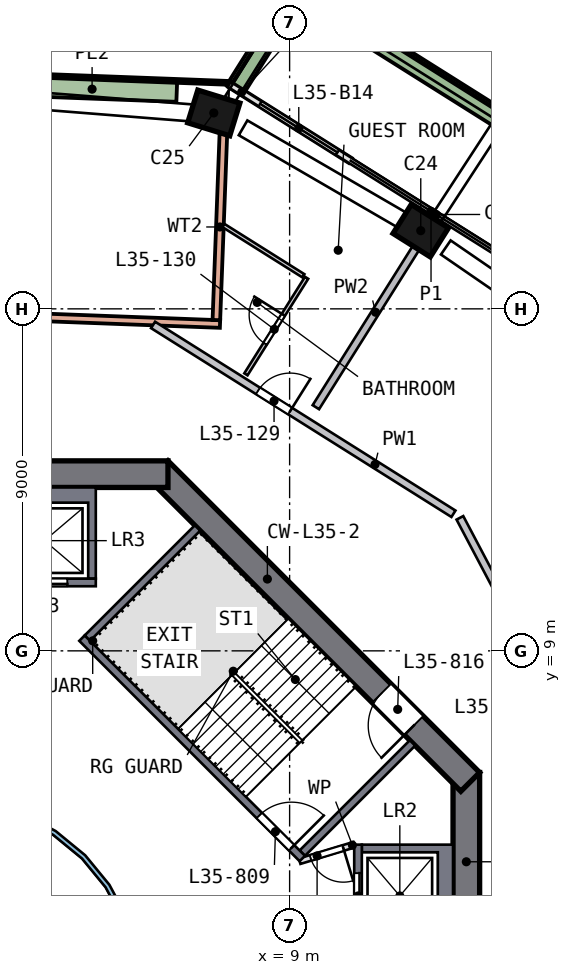
"""IFC4 building model, lengths in metres.
Left out: names, types, materials, properties, quantities, classifications, styles, units other than length and angle.
Written with IfcOpenShell. Run it as: python <this file> out.ifc"""

import sys

from ifc_helpers import new_model, si_unit, direction, frame, frame_2d, origin, origin_2d, place, context, subcontext, project, spatial, polyline, rectangle, outline, extrude, element, fill, save


model = new_model("IFC4")
c1 = context("Model", 3, precision=1e-05, world=origin(), true_north=direction((0.0, 1.0)))
c2 = subcontext(c1, "Body", "Model", "MODEL_VIEW")
j1 = project(units=[si_unit("LENGTHUNIT", "METRE"), si_unit("PLANEANGLEUNIT", "RADIAN")], contexts=[c1])
p1 = place(None, origin())
s1 = spatial("IfcSite", under=j1, at=p1, CompositionType="ELEMENT")
p2 = place(p1, origin())
s2 = spatial("IfcBuilding", under=s1, at=p2, CompositionType="ELEMENT")
p3 = place(p2, frame((0.0, 0.0, 147.0)))
s3 = spatial("IfcBuildingStorey", under=s2, at=p3, CompositionType="ELEMENT", Elevation=147.0)
p4 = place(p3, frame((12.566, 19.986, 0.0), z_axis=(-0.095595288, 0.05893902, 0.993673856), x_axis=(-0.841376242, 0.528653619, -0.112300359)))
e1 = element("IfcColumn", 1, at=p4, inside=s3, PredefinedType="COLUMN", context=c2, shape_type="SweptSolid", body=[
    extrude(rectangle(XDim=1.15, YDim=0.9, at=origin_2d()), origin(), (0.0, 0.0, 1.0), 3.21),
])
p5 = place(p3, frame((7.138, 23.116, 0.0), z_axis=(-0.110162783, 0.032995616, 0.993365718), x_axis=(0.949144669, -0.293088363, 0.114993952)))
e2 = element("IfcColumn", 2, at=p5, inside=s3, PredefinedType="COLUMN", context=c2, shape_type="SweptSolid", body=[
    extrude(rectangle(XDim=1.15, YDim=0.9, at=origin_2d()), origin(), (0.0, 0.0, 1.0), 3.211),
])
p6 = place(p3, frame((13.65, -5.799, 0.0), z_axis=(0.0, 0.0, 1.0), x_axis=(0.0, 1.0, 0.0)))
e3 = element("IfcWall", 3, at=p6, inside=s3, PredefinedType="SHEAR", context=c2, shape_type="SweptSolid", body=[
    extrude(rectangle(XDim=11.598, YDim=0.7, at=frame_2d((5.799, 0.0))), origin(), (0.0, 0.0, 1.0), 3.5),
])
p7 = place(p6, frame((4.899, 0.0, 0.0)))
e4 = element("IfcOpeningElement", 4, at=p7, cuts=e3, PredefinedType="OPENING", context=c2, shape_type="SweptSolid", body=[
    extrude(rectangle(XDim=1.8, YDim=2.1, at=frame_2d((0.9, 1.05))), frame((0.0, 0.36, 0.0), z_axis=(0.0, -1.0, 0.0), x_axis=(1.0, 0.0, 0.0)), (0.0, 0.0, 1.0), 0.72),
])
p8 = place(p3, frame((13.752, 5.552, 0.0), z_axis=(0.0, 0.0, 1.0), x_axis=(-0.707106781, 0.707106781, 0.0)))
e5 = element("IfcWall", 5, at=p8, inside=s3, PredefinedType="SHEAR", context=c2, shape_type="SweptSolid", body=[
    extrude(rectangle(XDim=11.598, YDim=0.7, at=frame_2d((5.799, 0.0))), origin(), (0.0, 0.0, 1.0), 3.5),
])
p9 = place(p8, frame((2.099, 0.0, 0.0)))
e6 = element("IfcOpeningElement", 6, at=p9, cuts=e5, PredefinedType="OPENING", context=c2, shape_type="SweptSolid", body=[
    extrude(rectangle(XDim=1.2, YDim=2.1, at=frame_2d((0.6, 1.05))), frame((0.0, 0.36, 0.0), z_axis=(0.0, -1.0, 0.0), x_axis=(1.0, 0.0, 0.0)), (0.0, 0.0, 1.0), 0.72),
])
p10 = place(p3, frame((5.799, 13.65, 0.0), z_axis=(0.0, 0.0, 1.0), x_axis=(-1.0, 0.0, 0.0)))
e7 = element("IfcWall", 7, at=p10, inside=s3, PredefinedType="SHEAR", context=c2, shape_type="SweptSolid", body=[
    extrude(rectangle(XDim=11.598, YDim=0.7, at=frame_2d((5.799, 0.0))), origin(), (0.0, 0.0, 1.0), 3.5),
])
p11 = place(p10, frame((4.899, 0.0, 0.0)))
e8 = element("IfcOpeningElement", 8, at=p11, cuts=e7, PredefinedType="OPENING", context=c2, shape_type="SweptSolid", body=[
    extrude(rectangle(XDim=1.8, YDim=2.1, at=frame_2d((0.9, 1.05))), frame((0.0, 0.36, 0.0), z_axis=(0.0, -1.0, 0.0), x_axis=(1.0, 0.0, 0.0)), (0.0, 0.0, 1.0), 0.72),
])
p12 = place(p3, frame((10.595, 21.905, 0.0), z_axis=(0.0, 0.0, 1.0), x_axis=(-0.846576204, 0.532267537, 0.0)))
e9 = element("IfcWall", 9, at=p12, inside=s3, PredefinedType="SOLIDWALL", context=c2, shape_type="SweptSolid", body=[
    extrude(rectangle(XDim=3.75, YDim=0.15, at=frame_2d((1.875, 0.0))), origin(), (0.0, 0.0, 1.0), 2.475),
])
p13 = place(p12, frame((0.4, 0.0, 0.0)))
e10 = element("IfcOpeningElement", 10, at=p13, cuts=e9, PredefinedType="OPENING", context=c2, shape_type="SweptSolid", body=[
    extrude(rectangle(XDim=2.4, YDim=2.4, at=frame_2d((1.2, 1.2))), frame((0.0, 0.085, 0.0), z_axis=(0.0, -1.0, 0.0), x_axis=(1.0, 0.0, 0.0)), (0.0, 0.0, 1.0), 0.17),
])
p14 = place(p3, frame((20.598, 19.189, 0.0), z_axis=(0.0, 0.0, 1.0), x_axis=(-0.846566005, 0.532283757, 0.0)))
e11 = element("IfcWall", 11, at=p14, inside=s3, PredefinedType="SOLIDWALL", context=c2, shape_type="SweptSolid", body=[
    extrude(rectangle(XDim=13.723, YDim=0.5, at=frame_2d((6.862, 0.0))), origin(), (0.0, 0.0, 1.0), 0.7),
])
p15 = place(p3, frame((9.059, 26.149, 0.0), z_axis=(0.0, 0.0, 1.0), x_axis=(-0.532314177, -0.846546878, 0.0)))
e12 = element("IfcWall", 12, at=p15, inside=s3, PredefinedType="SOLIDWALL", context=c2, shape_type="SweptSolid", body=[
    extrude(rectangle(XDim=2.699, YDim=0.5, at=frame_2d((1.35, 0.0))), origin(), (0.0, 0.0, 1.0), 0.7),
])
p16 = place(p3, frame((-5.822, 18.091, 0.0), z_axis=(0.0, 0.0, 1.0), x_axis=(0.999289416, -0.037691672, 0.0)))
e13 = element("IfcWall", 13, at=p16, inside=s3, PredefinedType="SOLIDWALL", context=c2, shape_type="SweptSolid", body=[
    extrude(rectangle(XDim=13.0, YDim=0.2, at=frame_2d((6.5, 0.0))), origin(), (0.0, 0.0, 1.0), 3.19),
])
p17 = place(p16, frame((5.6, 0.0, 0.0)))
e14 = element("IfcOpeningElement", 14, at=p17, cuts=e13, PredefinedType="OPENING", context=c2, shape_type="SweptSolid", body=[
    extrude(rectangle(XDim=1.8, YDim=2.4, at=frame_2d((0.9, 1.2))), frame((0.0, 0.11, 0.0), z_axis=(0.0, -1.0, 0.0), x_axis=(1.0, 0.0, 0.0)), (0.0, 0.0, 1.0), 0.22),
])
p18 = place(p3, frame((7.257, 22.605, 0.0), z_axis=(0.0, 0.0, 1.0), x_axis=(-0.037683686, -0.999289718, 0.0)))
e15 = element("IfcWall", 15, at=p18, inside=s3, PredefinedType="SOLIDWALL", context=c2, shape_type="SweptSolid", body=[
    extrude(rectangle(XDim=4.904, YDim=0.2, at=frame_2d((2.452, 0.0))), origin(), (0.0, 0.0, 1.0), 3.19),
])
p19 = place(p3, frame((7.328, 23.949, 0.0), z_axis=(0.0, 0.0, 1.0), x_axis=(-0.999289627, 0.037686082, 0.0)))
e16 = element("IfcWall", 16, at=p19, inside=s3, PredefinedType="SOLIDWALL", context=c2, shape_type="SweptSolid", body=[
    extrude(rectangle(XDim=12.84, YDim=0.1, at=frame_2d((6.42, 0.0))), origin(), (0.0, 0.0, 1.0), 0.7),
])
p20 = place(p3, frame((6.03, 23.698, 0.0), z_axis=(0.0, 0.0, 1.0), x_axis=(-0.999289619, 0.037686305, 0.0)))
e17 = element("IfcWall", 17, at=p20, inside=s3, PredefinedType="SOLIDWALL", context=c2, shape_type="SweptSolid", body=[
    extrude(rectangle(XDim=4.457, YDim=0.5, at=frame_2d((2.229, 0.0))), origin(), (0.0, 0.0, 1.0), 0.7),
])
p21 = place(p3, origin())
e18 = element("IfcWall", 18, at=p21, inside=s3, PredefinedType="SOLIDWALL", context=c2, shape_type="SweptSolid", body=[
    extrude(outline(polyline([(13.3, 3.9), (13.3, 1.2), (10.9, 1.2), (10.9, 1.4), (12.9, 1.4), (12.9, 3.7), (10.9, 3.7), (10.9, 3.9), (13.3, 3.9)])), origin(), (0.0, 0.0, 1.0), 3.19),
])
p22 = place(p3, frame((10.8, 1.2, 0.0), z_axis=(0.0, 0.0, 1.0), x_axis=(0.0, 1.0, 0.0)))
e19 = element("IfcWall", 19, at=p22, inside=s3, PredefinedType="SOLIDWALL", context=c2, shape_type="SweptSolid", body=[
    extrude(rectangle(XDim=2.7, YDim=0.2, at=frame_2d((1.35, 0.0))), origin(), (0.0, 0.0, 1.0), 3.19),
])
p23 = place(p22, frame((0.75, 0.0, 0.0)))
e20 = element("IfcOpeningElement", 20, at=p23, cuts=e19, PredefinedType="OPENING", context=c2, shape_type="SweptSolid", body=[
    extrude(rectangle(XDim=1.2, YDim=2.1, at=frame_2d((0.6, 1.05))), frame((0.0, 0.11, 0.0), z_axis=(0.0, -1.0, 0.0), x_axis=(1.0, 0.0, 0.0)), (0.0, 0.0, 1.0), 0.22),
])
p24 = place(p3, origin())
e21 = element("IfcWall", 21, at=p24, inside=s3, PredefinedType="SOLIDWALL", context=c2, shape_type="SweptSolid", body=[
    extrude(outline(polyline([(3.9, 13.3), (3.9, 10.9), (3.7, 10.9), (3.7, 12.9), (1.4, 12.9), (1.4, 10.9), (1.2, 10.9), (1.2, 13.3), (3.9, 13.3)])), origin(), (0.0, 0.0, 1.0), 3.19),
])
p25 = place(p3, frame((1.2, 10.8, 0.0), z_axis=(0.0, 0.0, 1.0), x_axis=(1.0, 0.0, 0.0)))
e22 = element("IfcWall", 22, at=p25, inside=s3, PredefinedType="SOLIDWALL", context=c2, shape_type="SweptSolid", body=[
    extrude(rectangle(XDim=2.7, YDim=0.2, at=frame_2d((1.35, 0.0))), origin(), (0.0, 0.0, 1.0), 3.19),
])
p26 = place(p25, frame((0.75, 0.0, 0.0)))
e23 = element("IfcOpeningElement", 23, at=p26, cuts=e22, PredefinedType="OPENING", context=c2, shape_type="SweptSolid", body=[
    extrude(rectangle(XDim=1.2, YDim=2.1, at=frame_2d((0.6, 1.05))), frame((0.0, 0.11, 0.0), z_axis=(0.0, -1.0, 0.0), x_axis=(1.0, 0.0, 0.0)), (0.0, 0.0, 1.0), 0.22),
])
p27 = place(p3, frame((3.535, 9.334, 0.0), z_axis=(0.0, 0.0, 1.0), x_axis=(0.707106781, -0.707106781, 0.0)))
e24 = element("IfcWall", 24, at=p27, inside=s3, PredefinedType="SOLIDWALL", context=c2, shape_type="SweptSolid", body=[
    extrude(rectangle(XDim=8.2, YDim=0.2, at=frame_2d((4.1, 0.0))), origin(), (0.0, 0.0, 1.0), 3.19),
])
p28 = place(p27, frame((6.6, 0.0, 0.0)))
e25 = element("IfcOpeningElement", 25, at=p28, cuts=e24, PredefinedType="OPENING", context=c2, shape_type="SweptSolid", body=[
    extrude(rectangle(XDim=1.2, YDim=2.1, at=frame_2d((0.6, 1.05))), frame((0.0, 0.11, 0.0), z_axis=(0.0, -1.0, 0.0), x_axis=(1.0, 0.0, 0.0)), (0.0, 0.0, 1.0), 0.22),
])
for number, where, z_axis, x_axis in (
    (26, (9.334, 3.677, 0.0), (0.0, 0.0, 1.0), (0.707, 0.707, 0.0)),
    (27, (3.677, 9.334, 0.0), (0.0, 0.0, 1.0), (0.707, 0.707, 0.0)),
):
    element("IfcWall", number, at=place(p3, frame(where, z_axis=z_axis, x_axis=x_axis)), inside=s3, PredefinedType="SOLIDWALL", context=c2, shape_type="SweptSolid", body=[
        extrude(rectangle(XDim=4.1, YDim=0.2, at=frame_2d((2.05, 0.0))), origin(), (0.0, 0.0, 1.0), 3.19),
    ])
p29 = place(p3, frame((10.7, 3.9, 0.0), z_axis=(0.0, 0.0, 1.0), x_axis=(-0.957084567, -0.289808785, 0.0)))
e28 = element("IfcWall", 28, at=p29, inside=s3, PredefinedType="PARTITIONING", context=c2, shape_type="SweptSolid", body=[
    extrude(rectangle(XDim=1.501, YDim=0.15, at=frame_2d((0.75, 0.0))), origin(), (0.0, 0.0, 1.0), 3.19),
])
p30 = place(p29, frame((0.301, 0.0, 0.0)))
e29 = element("IfcOpeningElement", 29, at=p30, cuts=e28, PredefinedType="OPENING", context=c2, shape_type="SweptSolid", body=[
    extrude(rectangle(XDim=0.9, YDim=2.1, at=frame_2d((0.45, 1.05))), frame((0.0, 0.085, 0.0), z_axis=(0.0, -1.0, 0.0), x_axis=(1.0, 0.0, 0.0)), (0.0, 0.0, 1.0), 0.17),
])
p31 = place(p3, origin())
e30 = element("IfcWall", 30, at=p31, inside=s3, PredefinedType="SOLIDWALL", context=c2, shape_type="SweptSolid", body=[
    extrude(outline(polyline([(5.021, -0.999), (4.73, -1.959), (4.257, -2.844), (3.62, -3.62), (2.844, -4.257), (1.959, -4.73), (0.999, -5.021), (0.0, -5.12), (-0.999, -5.021), (-1.959, -4.73), (-2.844, -4.257), (-3.62, -3.62), (-4.257, -2.844), (-4.73, -1.959), (-5.021, -0.999), (-5.12, 0.0), (-5.021, 0.999), (-4.73, 1.959), (-4.257, 2.844), (-3.62, 3.62), (-2.844, 4.257), (-1.959, 4.73), (-0.999, 5.021), (0.0, 5.12), (0.999, 5.021), (1.959, 4.73), (2.844, 4.257), (3.62, 3.62), (4.257, 2.844), (4.73, 1.959), (5.021, 0.999), (5.12, 0.0), (5.021, -0.999)]), holes=[polyline([(4.904, 0.976), (4.619, 1.913), (4.157, 2.778), (3.535, 3.535), (2.778, 4.157), (1.913, 4.619), (0.976, 4.904), (0.0, 5.0), (-0.976, 4.904), (-1.913, 4.619), (-2.778, 4.157), (-3.535, 3.535), (-4.157, 2.778), (-4.619, 1.913), (-4.904, 0.976), (-5.0, 0.0), (-4.904, -0.976), (-4.619, -1.913), (-4.157, -2.778), (-3.535, -3.535), (-2.778, -4.157), (-1.913, -4.619), (-0.976, -4.904), (0.0, -5.0), (0.976, -4.904), (1.913, -4.619), (2.778, -4.157), (3.535, -3.535), (4.157, -2.778), (4.619, -1.913), (4.904, -0.976), (5.0, 0.0), (4.904, 0.976)])]), origin(), (0.0, 0.0, 1.0), 3.19),
])
p32 = place(p3, frame((5.407, 17.577, 0.0), z_axis=(0.0, 0.0, 1.0), x_axis=(0.846570227, -0.532277043, 0.0)))
e31 = element("IfcWall", 31, at=p32, inside=s3, PredefinedType="SOLIDWALL", context=c2, shape_type="SweptSolid", body=[
    extrude(rectangle(XDim=9.336, YDim=0.2, at=frame_2d((4.668, 0.0))), origin(), (0.0, 0.0, 1.0), 3.19),
])
p33 = place(p32, frame((3.26, 0.0, 0.0)))
e32 = element("IfcOpeningElement", 32, at=p33, cuts=e31, PredefinedType="OPENING", context=c2, shape_type="SweptSolid", body=[
    extrude(rectangle(XDim=1.0, YDim=2.1, at=frame_2d((0.5, 1.05))), frame((0.0, 0.11, 0.0), z_axis=(0.0, -1.0, 0.0), x_axis=(1.0, 0.0, 0.0)), (0.0, 0.0, 1.0), 0.22),
])
p34 = place(p3, frame((13.481, 12.5, 0.0), z_axis=(0.0, 0.0, 1.0), x_axis=(0.466998873, -0.884257911, 0.0)))
e33 = element("IfcWall", 33, at=p34, inside=s3, PredefinedType="SOLIDWALL", context=c2, shape_type="SweptSolid", body=[
    extrude(rectangle(XDim=9.316, YDim=0.2, at=frame_2d((4.658, 0.0))), origin(), (0.0, 0.0, 1.0), 3.19),
])
p35 = place(p34, frame((5.15, 0.0, 0.0)))
e34 = element("IfcOpeningElement", 34, at=p35, cuts=e33, PredefinedType="OPENING", context=c2, shape_type="SweptSolid", body=[
    extrude(rectangle(XDim=1.0, YDim=2.1, at=frame_2d((0.5, 1.05))), frame((0.0, 0.11, 0.0), z_axis=(0.0, -1.0, 0.0), x_axis=(1.0, 0.0, 0.0)), (0.0, 0.0, 1.0), 0.22),
])
p36 = place(p3, frame((9.691, 15.412, 0.0), z_axis=(0.0, 0.0, 1.0), x_axis=(0.532272342, 0.846573183, 0.0)))
e35 = element("IfcWall", 35, at=p36, inside=s3, PredefinedType="SOLIDWALL", context=c2, shape_type="SweptSolid", body=[
    extrude(rectangle(XDim=5.903, YDim=0.2, at=frame_2d((2.951, 0.0))), origin(), (0.0, 0.0, 1.0), 3.19),
])
p37 = place(p3, frame((7.249, 20.199, 0.0), z_axis=(0.0, 0.0, 1.0), x_axis=(0.846572341, -0.532273681, 0.0)))
e36 = element("IfcWall", 36, at=p37, inside=s3, PredefinedType="PARTITIONING", context=c2, shape_type="SweptSolid", body=[
    extrude(rectangle(XDim=2.497, YDim=0.1, at=frame_2d((1.248, 0.0))), origin(), (0.0, 0.0, 1.0), 3.19),
])
p38 = place(p3, frame((7.85, 16.277, 0.0), z_axis=(0.0, 0.0, 1.0), x_axis=(0.532286535, 0.846564259, 0.0)))
e37 = element("IfcWall", 37, at=p38, inside=s3, PredefinedType="PARTITIONING", context=c2, shape_type="SweptSolid", body=[
    extrude(rectangle(XDim=3.0, YDim=0.1, at=frame_2d((1.5, 0.0))), origin(), (0.0, 0.0, 1.0), 3.19),
])
p39 = place(p38, frame((0.95, 0.0, 0.0)))
e38 = element("IfcOpeningElement", 38, at=p39, cuts=e37, PredefinedType="OPENING", context=c2, shape_type="SweptSolid", body=[
    extrude(rectangle(XDim=0.9, YDim=2.1, at=frame_2d((0.45, 1.05))), frame((0.0, 0.06, 0.0), z_axis=(0.0, -1.0, 0.0), x_axis=(1.0, 0.0, 0.0)), (0.0, 0.0, 1.0), 0.12),
])
p40 = place(p13, origin())
e39 = element("IfcDoor", 39, at=p40, inside=s3, OperationType="SLIDING_TO_RIGHT", PredefinedType="DOOR", context=c2, shape_type="SweptSolid", body=[
    extrude(rectangle(XDim=2.4, YDim=2.4, at=frame_2d((1.2, 1.2))), frame((0.0, 0.025, 0.0), z_axis=(0.0, -1.0, 0.0), x_axis=(1.0, 0.0, 0.0)), (0.0, 0.0, 1.0), 0.05),
])
fill(e10, e39)
p41 = place(p23, origin())
e40 = element("IfcDoor", 40, at=p41, inside=s3, OperationType="DOUBLE_DOOR_SLIDING", PredefinedType="DOOR", context=c2, shape_type="SweptSolid", body=[
    extrude(rectangle(XDim=1.2, YDim=2.1, at=frame_2d((0.6, 1.05))), frame((0.0, 0.025, 0.0), z_axis=(0.0, -1.0, 0.0), x_axis=(1.0, 0.0, 0.0)), (0.0, 0.0, 1.0), 0.05),
])
fill(e20, e40)
p42 = place(p26, origin())
e41 = element("IfcDoor", 41, at=p42, inside=s3, OperationType="DOUBLE_DOOR_SLIDING", PredefinedType="DOOR", context=c2, shape_type="SweptSolid", body=[
    extrude(rectangle(XDim=1.2, YDim=2.1, at=frame_2d((0.6, 1.05))), frame((0.0, 0.025, 0.0), z_axis=(0.0, -1.0, 0.0), x_axis=(1.0, 0.0, 0.0)), (0.0, 0.0, 1.0), 0.05),
])
fill(e23, e41)
p43 = place(p28, origin())
e42 = element("IfcDoor", 42, at=p43, inside=s3, OperationType="SINGLE_SWING_RIGHT", PredefinedType="DOOR", context=c2, shape_type="SweptSolid", body=[
    extrude(rectangle(XDim=1.2, YDim=2.1, at=frame_2d((0.6, 1.05))), frame((0.0, 0.025, 0.0), z_axis=(0.0, -1.0, 0.0), x_axis=(1.0, 0.0, 0.0)), (0.0, 0.0, 1.0), 0.05),
])
fill(e25, e42)
p44 = place(p9, origin())
e43 = element("IfcDoor", 43, at=p44, inside=s3, OperationType="SINGLE_SWING_LEFT", PredefinedType="DOOR", context=c2, shape_type="SweptSolid", body=[
    extrude(rectangle(XDim=1.2, YDim=2.1, at=frame_2d((0.6, 1.05))), frame((0.0, 0.025, 0.0), z_axis=(0.0, -1.0, 0.0), x_axis=(1.0, 0.0, 0.0)), (0.0, 0.0, 1.0), 0.05),
])
fill(e6, e43)
p45 = place(p30, origin())
e44 = element("IfcDoor", 44, at=p45, inside=s3, OperationType="SINGLE_SWING_LEFT", PredefinedType="DOOR", context=c2, shape_type="SweptSolid", body=[
    extrude(rectangle(XDim=0.9, YDim=2.1, at=frame_2d((0.45, 1.05))), frame((0.0, 0.025, 0.0), z_axis=(0.0, -1.0, 0.0), x_axis=(1.0, 0.0, 0.0)), (0.0, 0.0, 1.0), 0.05),
])
fill(e29, e44)
p46 = place(p33, origin())
e45 = element("IfcDoor", 45, at=p46, inside=s3, OperationType="SINGLE_SWING_RIGHT", PredefinedType="DOOR", context=c2, shape_type="SweptSolid", body=[
    extrude(rectangle(XDim=1.0, YDim=2.1, at=frame_2d((0.5, 1.05))), frame((0.0, 0.025, 0.0), z_axis=(0.0, -1.0, 0.0), x_axis=(1.0, 0.0, 0.0)), (0.0, 0.0, 1.0), 0.05),
])
fill(e32, e45)
p47 = place(p39, origin())
e46 = element("IfcDoor", 46, at=p47, inside=s3, OperationType="SINGLE_SWING_RIGHT", PredefinedType="DOOR", context=c2, shape_type="SweptSolid", body=[
    extrude(rectangle(XDim=0.9, YDim=2.1, at=frame_2d((0.45, 1.05))), frame((0.0, 0.025, 0.0), z_axis=(0.0, -1.0, 0.0), x_axis=(1.0, 0.0, 0.0)), (0.0, 0.0, 1.0), 0.05),
])
fill(e38, e46)
save(model, sys.argv[1])
